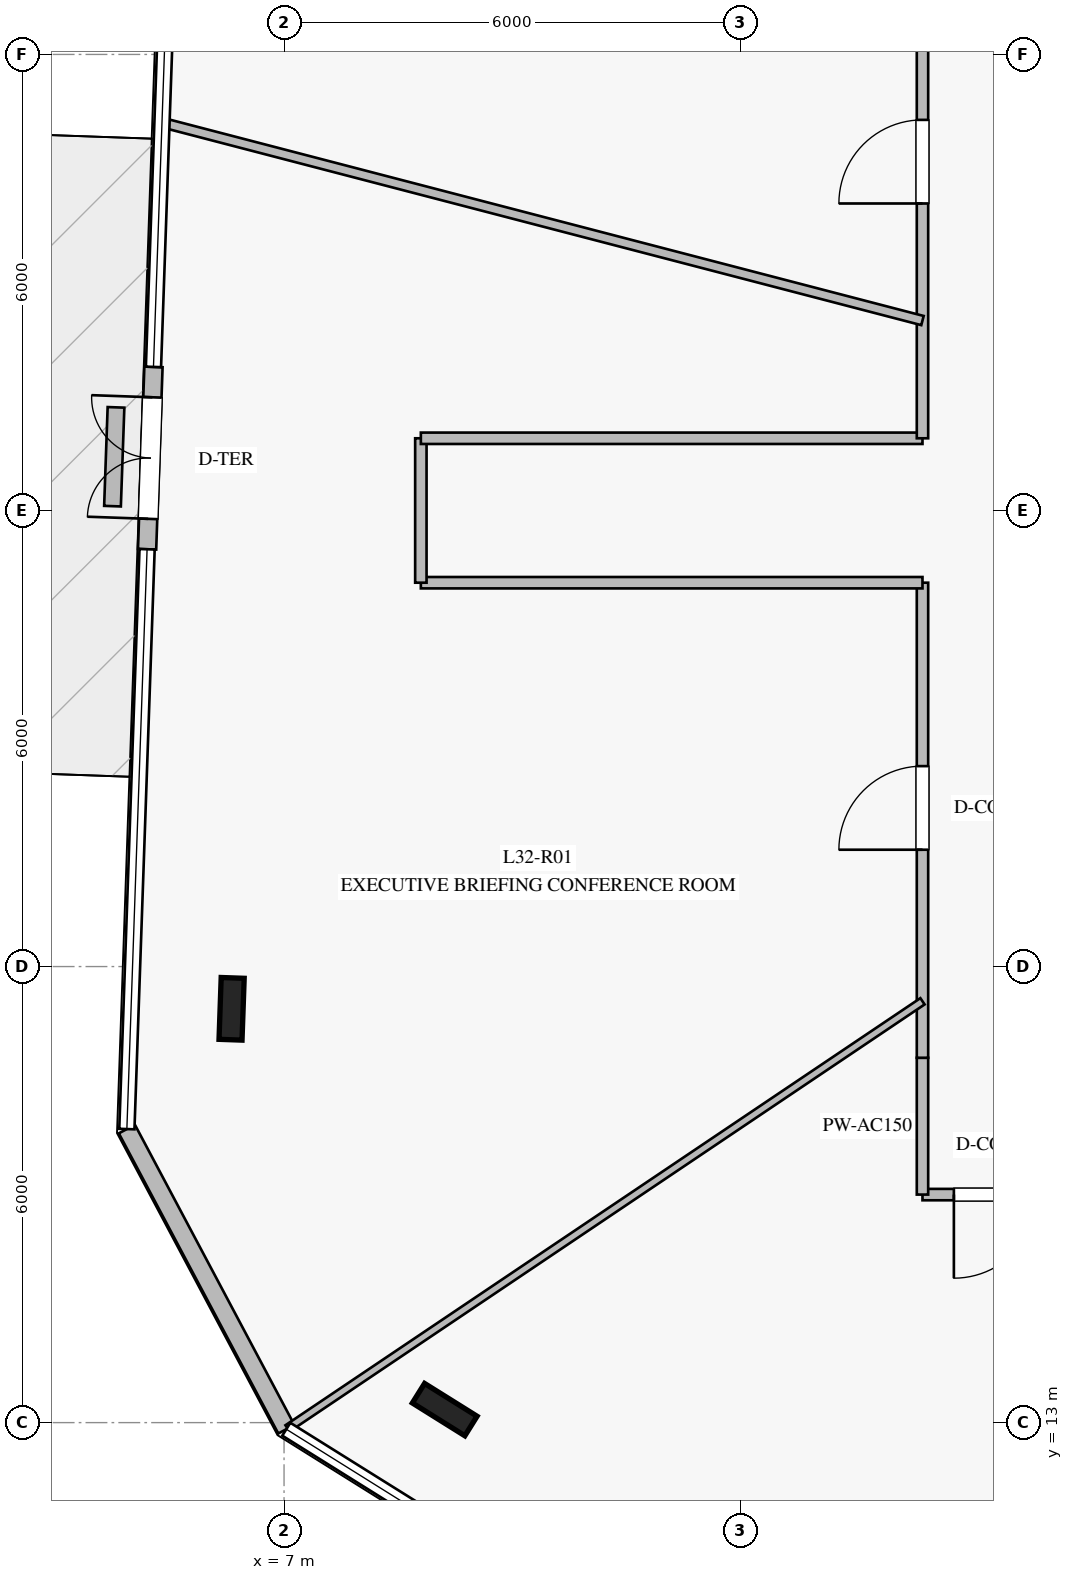
"""IFC4 building model, lengths in metres.
Left out: names, types, materials, properties, quantities, classifications, styles, units other than length and angle.
Written with IfcOpenShell. Run it as: python <this file> out.ifc"""

import sys

from ifc_helpers import new_model, si_unit, direction, frame, frame_2d, origin, origin_2d, place, context, subcontext, project, spatial, rectangle, i_section, extrude, element, fill, save


model = new_model("IFC4")
c1 = context("Model", 3, precision=1e-05, world=origin(), true_north=direction((0.0, 1.0)))
c2 = subcontext(c1, "Body", "Model", "MODEL_VIEW")
j1 = project(units=[si_unit("LENGTHUNIT", "METRE"), si_unit("PLANEANGLEUNIT", "RADIAN")], contexts=[c1])
p1 = place(None, origin())
s1 = spatial("IfcSite", under=j1, at=p1, CompositionType="ELEMENT")
p2 = place(p1, origin())
s2 = spatial("IfcBuilding", under=s1, at=p2, CompositionType="ELEMENT")
p3 = place(p2, frame((0.0, 0.0, 134.4)))
s3 = spatial("IfcBuildingStorey", under=s2, at=p3, CompositionType="ELEMENT", Elevation=134.4)
for number, where, z_axis, x_axis in (
    (1, (6.31, 18.444, 0.0), (0.0, 0.0, 1.0), (0.035, 0.999, 0.0)),
    (2, (9.114, 13.171, 0.0), (0.0, 0.0, 1.0), (-0.848, 0.53, 0.0)),
):
    element("IfcColumn", number, at=place(p3, frame(where, z_axis=z_axis, x_axis=x_axis)), inside=s3, PredefinedType="COLUMN", context=c2, shape_type="SweptSolid", body=[
        extrude(i_section(OverallWidth=0.303, OverallDepth=0.814, WebThickness=0.021, FlangeThickness=0.04, at=origin_2d()), origin(), (0.0, 0.0, 1.0), 4.0),
    ])
p4 = place(p3, frame((5.282, 26.889, 0.0), z_axis=(0.0, 0.0, 1.0), x_axis=(-0.03498772474, -0.999387742129, 0.0)))
e3 = element("IfcWall", 3, at=p4, inside=s3, PredefinedType="STANDARD", context=c2, shape_type="SweptSolid", body=[
    extrude(rectangle(XDim=2.4, YDim=0.24, at=frame_2d((1.2, 0.0))), origin(), (0.0, 0.0, 1.0), 3.76),
])
p5 = place(p4, frame((0.4, 0.0, 0.0)))
e4 = element("IfcOpeningElement", 4, at=p5, cuts=e3, PredefinedType="OPENING", context=c2, shape_type="SweptSolid", body=[
    extrude(rectangle(XDim=1.6, YDim=2.25, at=frame_2d((0.8, 1.125))), frame((0.0, 0.13, 0.0), z_axis=(0.0, -1.0, 0.0), x_axis=(1.0, 0.0, 0.0)), (0.0, 0.0, 1.0), 0.26),
])
p6 = place(p3, frame((4.932, 16.862, 0.0), z_axis=(0.0, 0.0, 1.0), x_axis=(0.46919913514, -0.883092391307, 0.0)))
e5 = element("IfcWall", 5, at=p6, inside=s3, PredefinedType="STANDARD", context=c2, shape_type="SweptSolid", body=[
    extrude(rectangle(XDim=4.472, YDim=0.24, at=frame_2d((2.236, 0.0))), origin(), (0.0, 0.0, 1.0), 3.76),
])
p7 = place(p3, frame((4.789, 26.357, 0.0), z_axis=(0.0, 0.0, 1.0), x_axis=(-0.035470622719, -0.999370719465, 0.0)))
e6 = element("IfcWall", 6, at=p7, inside=s3, PredefinedType="USERDEFINED", context=c2, shape_type="SweptSolid", body=[
    extrude(rectangle(XDim=1.301, YDim=0.22, at=frame_2d((0.65, 0.0))), origin(), (0.0, 0.0, 1.0), 0.4),
])
p8 = place(p3, frame((17.2, 16.0, 0.0), z_axis=(0.0, 0.0, 1.0), x_axis=(-1.0, 0.0, 0.0)))
e7 = element("IfcWall", 7, at=p8, inside=s3, PredefinedType="PARTITIONING", context=c2, shape_type="SweptSolid", body=[
    extrude(rectangle(XDim=1.8, YDim=0.15, at=frame_2d((0.9, 0.0))), origin(), (0.0, 0.0, 1.0), 3.36),
])
p9 = place(p8, frame((0.287, 0.0, 0.0)))
e8 = element("IfcOpeningElement", 8, at=p9, cuts=e7, PredefinedType="OPENING", context=c2, shape_type="SweptSolid", body=[
    extrude(rectangle(XDim=1.1, YDim=2.2, at=frame_2d((0.55, 1.1))), frame((0.0, 0.085, 0.0), z_axis=(0.0, -1.0, 0.0), x_axis=(1.0, 0.0, 0.0)), (0.0, 0.0, 1.0), 0.17),
])
p10 = place(p3, frame((15.4, 16.0, 0.0), z_axis=(0.0, 0.0, 1.0), x_axis=(0.0, 1.0, 0.0)))
e9 = element("IfcWall", 9, at=p10, inside=s3, PredefinedType="PARTITIONING", context=c2, shape_type="SweptSolid", body=[
    extrude(rectangle(XDim=1.8, YDim=0.15, at=frame_2d((0.9, 0.0))), origin(), (0.0, 0.0, 1.0), 3.21),
])
p11 = place(p3, frame((15.4, 17.8, 0.0), z_axis=(0.0, 0.0, 1.0), x_axis=(0.0, 1.0, 0.0)))
e10 = element("IfcWall", 10, at=p11, inside=s3, PredefinedType="PARTITIONING", context=c2, shape_type="SweptSolid", body=[
    extrude(rectangle(XDim=6.25, YDim=0.15, at=frame_2d((3.125, 0.0))), origin(), (0.0, 0.0, 1.0), 3.21),
])
p12 = place(p11, frame((2.737, 0.0, 0.0)))
e11 = element("IfcOpeningElement", 11, at=p12, cuts=e10, PredefinedType="OPENING", context=c2, shape_type="SweptSolid", body=[
    extrude(rectangle(XDim=1.1, YDim=2.2, at=frame_2d((0.55, 1.1))), frame((0.0, 0.085, 0.0), z_axis=(0.0, -1.0, 0.0), x_axis=(1.0, 0.0, 0.0)), (0.0, 0.0, 1.0), 0.17),
])
p13 = place(p3, frame((15.4, 24.05, 0.0), z_axis=(0.0, 0.0, 1.0), x_axis=(-1.0, 0.0, 0.0)))
e12 = element("IfcWall", 12, at=p13, inside=s3, PredefinedType="PARTITIONING", context=c2, shape_type="SweptSolid", body=[
    extrude(rectangle(XDim=6.6, YDim=0.15, at=frame_2d((3.3, 0.0))), origin(), (0.0, 0.0, 1.0), 3.36),
])
p14 = place(p3, frame((8.8, 24.05, 0.0), z_axis=(0.0, 0.0, 1.0), x_axis=(0.0, 1.0, 0.0)))
e13 = element("IfcWall", 13, at=p14, inside=s3, PredefinedType="PARTITIONING", context=c2, shape_type="SweptSolid", body=[
    extrude(rectangle(XDim=1.9, YDim=0.15, at=frame_2d((0.95, 0.0))), origin(), (0.0, 0.0, 1.0), 3.76),
])
p15 = place(p3, frame((8.8, 25.95, 0.0), z_axis=(0.0, 0.0, 1.0), x_axis=(1.0, 0.0, 0.0)))
e14 = element("IfcWall", 14, at=p15, inside=s3, PredefinedType="PARTITIONING", context=c2, shape_type="SweptSolid", body=[
    extrude(rectangle(XDim=6.6, YDim=0.15, at=frame_2d((3.3, 0.0))), origin(), (0.0, 0.0, 1.0), 3.36),
])
p16 = place(p3, frame((15.4, 25.95, 0.0), z_axis=(0.0, 0.0, 1.0), x_axis=(0.0, 1.0, 0.0)))
e15 = element("IfcWall", 15, at=p16, inside=s3, PredefinedType="PARTITIONING", context=c2, shape_type="SweptSolid", body=[
    extrude(rectangle(XDim=6.25, YDim=0.15, at=frame_2d((3.125, 0.0))), origin(), (0.0, 0.0, 1.0), 3.21),
])
p17 = place(p16, frame((3.089, 0.0, 0.0)))
e16 = element("IfcOpeningElement", 16, at=p17, cuts=e15, PredefinedType="OPENING", context=c2, shape_type="SweptSolid", body=[
    extrude(rectangle(XDim=1.1, YDim=2.2, at=frame_2d((0.55, 1.1))), frame((0.0, 0.085, 0.0), z_axis=(0.0, -1.0, 0.0), x_axis=(1.0, 0.0, 0.0)), (0.0, 0.0, 1.0), 0.17),
])
p18 = place(p3, frame((15.4, 27.499, 0.0), z_axis=(0.0, 0.0, 1.0), x_axis=(-0.96772970211, 0.251990522945, 0.0)))
e17 = element("IfcWall", 17, at=p18, inside=s3, PredefinedType="PARTITIONING", context=c2, shape_type="SweptSolid", body=[
    extrude(rectangle(XDim=10.322, YDim=0.125, at=frame_2d((5.161, 0.0))), origin(), (0.0, 0.0, 1.0), 3.16),
])
p19 = place(p3, frame((15.4, 18.543, 0.0), z_axis=(0.0, 0.0, 1.0), x_axis=(-0.829771318012, -0.558103538607, 0.0)))
e18 = element("IfcWall", 18, at=p19, inside=s3, PredefinedType="MOVABLE", context=c2, shape_type="SweptSolid", body=[
    extrude(rectangle(XDim=10.068, YDim=0.1, at=frame_2d((5.034, 0.0))), origin(), (0.0, 0.0, 1.0), 3.16),
])
p20 = place(p5, frame((1.6, 0.0, 0.0), z_axis=(0.0, 0.0, 1.0), x_axis=(-1.0, 0.0, 0.0)))
e19 = element("IfcDoor", 19, at=p20, inside=s3, OperationType="DOUBLE_DOOR_SINGLE_SWING", PredefinedType="DOOR", context=c2, shape_type="SweptSolid", body=[
    extrude(rectangle(XDim=1.6, YDim=2.25, at=frame_2d((0.8, 1.125))), frame((0.0, 0.025, 0.0), z_axis=(0.0, -1.0, 0.0), x_axis=(1.0, 0.0, 0.0)), (0.0, 0.0, 1.0), 0.05),
])
fill(e4, e19)
p21 = place(p12, origin())
e20 = element("IfcDoor", 20, at=p21, inside=s3, OperationType="SINGLE_SWING_LEFT", PredefinedType="DOOR", context=c2, shape_type="SweptSolid", body=[
    extrude(rectangle(XDim=1.1, YDim=2.2, at=frame_2d((0.55, 1.1))), frame((0.0, 0.025, 0.0), z_axis=(0.0, -1.0, 0.0), x_axis=(1.0, 0.0, 0.0)), (0.0, 0.0, 1.0), 0.05),
])
fill(e11, e20)
p22 = place(p9, origin())
e21 = element("IfcDoor", 21, at=p22, inside=s3, OperationType="SINGLE_SWING_RIGHT", PredefinedType="DOOR", context=c2, shape_type="SweptSolid", body=[
    extrude(rectangle(XDim=1.1, YDim=2.2, at=frame_2d((0.55, 1.1))), frame((0.0, 0.025, 0.0), z_axis=(0.0, -1.0, 0.0), x_axis=(1.0, 0.0, 0.0)), (0.0, 0.0, 1.0), 0.05),
])
fill(e8, e21)
p23 = place(p17, origin())
e22 = element("IfcDoor", 22, at=p23, inside=s3, OperationType="SINGLE_SWING_LEFT", PredefinedType="DOOR", context=c2, shape_type="SweptSolid", body=[
    extrude(rectangle(XDim=1.1, YDim=2.2, at=frame_2d((0.55, 1.1))), frame((0.0, 0.025, 0.0), z_axis=(0.0, -1.0, 0.0), x_axis=(1.0, 0.0, 0.0)), (0.0, 0.0, 1.0), 0.05),
])
fill(e16, e22)
save(model, sys.argv[1])
